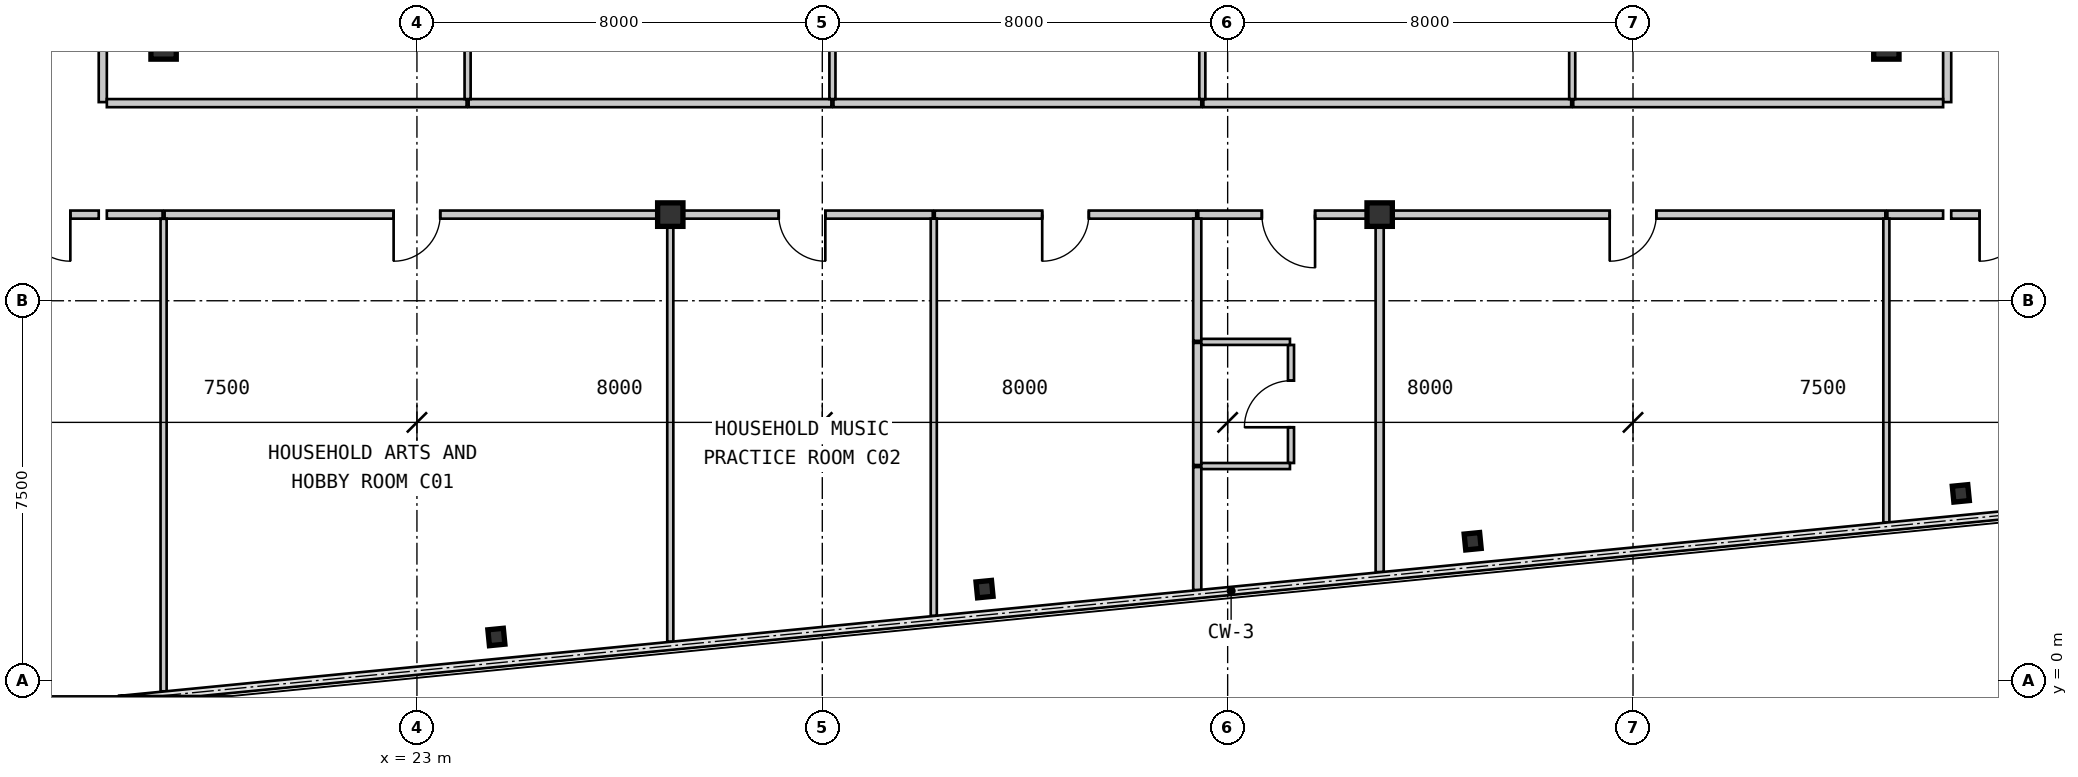
"""IFC4 building model, lengths in metres.
Left out: names, types, materials, properties, quantities, classifications, styles, units other than length and angle.
Written with IfcOpenShell. Run it as: python <this file> out.ifc"""

import sys

from ifc_helpers import new_model, si_unit, direction, frame, frame_2d, origin, origin_2d, place, context, subcontext, project, spatial, rectangle, i_section, extrude, source, transform, mapped, element, fill, save


model = new_model("IFC4")
c1 = context("Model", 3, precision=1e-05, world=origin(), true_north=direction((0.0, 1.0)))
c2 = subcontext(c1, "Body", "Model", "MODEL_VIEW")
j1 = project(units=[si_unit("LENGTHUNIT", "METRE"), si_unit("PLANEANGLEUNIT", "RADIAN")], contexts=[c1])
p1 = place(None, origin())
s1 = spatial("IfcSite", under=j1, at=p1, CompositionType="ELEMENT")
p2 = place(p1, origin())
s2 = spatial("IfcBuilding", under=s1, at=p2, CompositionType="ELEMENT")
p3 = place(p2, frame((0.0, 0.0, 93.45)))
s3 = spatial("IfcBuildingStorey", under=s2, at=p3, CompositionType="ELEMENT", Elevation=93.45)
m1 = source(origin(), c2, "Body", "SweptSolid", [
    extrude(i_section(OverallWidth=0.5, OverallDepth=0.464, WebThickness=0.022, FlangeThickness=0.034, at=origin_2d()), origin(), (0.0, 0.0, 1.0), 3.15),
])
for number, where, z_axis, x_axis in (
    (1, (28.0, 9.2, 0.0), (0.0, 0.0, 1.0), (1.0, 0.0, 0.0)),
    (2, (42.0, 9.2, 0.0), (0.0, 0.0, 1.0), (1.0, 0.0, 0.0)),
    (3, (18.0, 12.5, 0.0), (0.0, 0.0, 1.0), (1.0, 0.0, 0.0)),
    (4, (52.0, 12.5, 0.0), (0.0, 0.0, 1.0), (1.0, 0.0, 0.0)),
):
    element("IfcColumn", number, at=place(p3, frame(where, z_axis=z_axis, x_axis=x_axis)), inside=s3, PredefinedType="COLUMN", context=c2, shape_type="MappedRepresentation", body=[
        mapped(m1, transform((0.0, 0.0, 0.0), scale=1.0)),
    ])
m2 = source(origin(), c2, "Body", "SweptSolid", [
    extrude(i_section(OverallWidth=0.307, OverallDepth=0.315, WebThickness=0.012, FlangeThickness=0.019, at=origin_2d()), origin(), (0.0, 0.0, 1.0), 3.15),
])
for number, where, z_axis, x_axis in (
    (5, (24.568, 0.865, 0.0), (0.0, 0.0, 1.0), (0.995, 0.098, 0.0)),
    (6, (34.202, 1.809, 0.0), (0.0, 0.0, 1.0), (0.995, 0.098, 0.0)),
    (7, (43.835, 2.754, 0.0), (0.0, 0.0, 1.0), (0.995, 0.098, 0.0)),
    (8, (53.469, 3.698, 0.0), (0.0, 0.0, 1.0), (0.995, 0.098, 0.0)),
):
    element("IfcColumn", number, at=place(p3, frame(where, z_axis=z_axis, x_axis=x_axis)), inside=s3, PredefinedType="COLUMN", context=c2, shape_type="MappedRepresentation", body=[
        mapped(m2, transform((0.0, 0.0, 0.0), scale=1.0)),
    ])
m3 = source(origin(), c2, "Body", "SweptSolid", [
    extrude(rectangle(XDim=10.3, YDim=0.16, at=frame_2d((5.15, 0.0))), origin(), (0.0, 0.0, 1.0), 2.93),
])
p4 = place(p3, frame((16.8, 21.72, 0.0), z_axis=(0.0, 0.0, 1.0), x_axis=(0.0, -1.0, 0.0)))
e9 = element("IfcWall", 9, at=p4, inside=s3, PredefinedType="PARTITIONING", context=c2, shape_type="MappedRepresentation", body=[
    mapped(m3, transform((0.0, 0.0, 0.0), scale=1.0)),
])
m4 = source(origin(), c2, "Body", "SweptSolid", [
    extrude(rectangle(XDim=1.05, YDim=2.1, at=frame_2d((0.525, 1.05))), frame((0.0, 0.09, 0.0), z_axis=(0.0, -1.0, 0.0), x_axis=(1.0, 0.0, 0.0)), (0.0, 0.0, 1.0), 0.18),
])
p5 = place(p4, frame((4.595, 0.0, 0.0)))
e10 = element("IfcOpeningElement", 10, at=p5, cuts=e9, PredefinedType="OPENING", context=c2, shape_type="MappedRepresentation", body=[
    mapped(m4, transform((0.0, 0.0, 0.0), scale=1.0)),
])
p6 = place(p3, frame((53.2, 11.42, 0.0), z_axis=(0.0, 0.0, 1.0), x_axis=(0.0, 1.0, 0.0)))
e11 = element("IfcWall", 11, at=p6, inside=s3, PredefinedType="PARTITIONING", context=c2, shape_type="MappedRepresentation", body=[
    mapped(m3, transform((0.0, 0.0, 0.0), scale=1.0)),
])
p7 = place(p6, frame((4.655, 0.0, 0.0)))
e12 = element("IfcOpeningElement", 12, at=p7, cuts=e11, PredefinedType="OPENING", context=c2, shape_type="MappedRepresentation", body=[
    mapped(m4, transform((0.0, 0.0, 0.0), scale=1.0)),
])
m5 = source(origin(), c2, "Body", "SweptSolid", [
    extrude(rectangle(XDim=2.04, YDim=0.16, at=frame_2d((1.02, 0.0))), origin(), (0.0, 0.0, 1.0), 2.93),
])
p8 = place(p3, frame((16.72, 9.2, 0.0), z_axis=(0.0, 0.0, 1.0), x_axis=(-1.0, 0.0, 0.0)))
e13 = element("IfcWall", 13, at=p8, inside=s3, PredefinedType="PARTITIONING", context=c2, shape_type="MappedRepresentation", body=[
    mapped(m5, transform((0.0, 0.0, 0.0), scale=1.0)),
])
m6 = source(origin(), c2, "Body", "SweptSolid", [
    extrude(rectangle(XDim=0.92, YDim=2.1, at=frame_2d((0.46, 1.05))), frame((0.0, 0.09, 0.0), z_axis=(0.0, -1.0, 0.0), x_axis=(1.0, 0.0, 0.0)), (0.0, 0.0, 1.0), 0.18),
])
p9 = place(p8, frame((0.56, 0.0, 0.0)))
e14 = element("IfcOpeningElement", 14, at=p9, cuts=e13, PredefinedType="OPENING", context=c2, shape_type="MappedRepresentation", body=[
    mapped(m6, transform((0.0, 0.0, 0.0), scale=1.0)),
])
p10 = place(p3, frame((55.32, 9.2, 0.0), z_axis=(0.0, 0.0, 1.0), x_axis=(-1.0, 0.0, 0.0)))
e15 = element("IfcWall", 15, at=p10, inside=s3, PredefinedType="PARTITIONING", context=c2, shape_type="MappedRepresentation", body=[
    mapped(m5, transform((0.0, 0.0, 0.0), scale=1.0)),
])
p11 = place(p10, frame((0.56, 0.0, 0.0)))
e16 = element("IfcOpeningElement", 16, at=p11, cuts=e15, PredefinedType="OPENING", context=c2, shape_type="MappedRepresentation", body=[
    mapped(m6, transform((0.0, 0.0, 0.0), scale=1.0)),
])
m7 = source(origin(), c2, "Body", "SweptSolid", [
    extrude(rectangle(XDim=7.1, YDim=0.16, at=frame_2d((3.55, 0.0))), origin(), (0.0, 0.0, 1.0), 2.93),
])
p12 = place(p3, frame((16.88, 11.4, 0.0), z_axis=(0.0, 0.0, 1.0), x_axis=(1.0, 0.0, 0.0)))
e17 = element("IfcWall", 17, at=p12, inside=s3, PredefinedType="PARTITIONING", context=c2, shape_type="MappedRepresentation", body=[
    mapped(m7, transform((0.0, 0.0, 0.0), scale=1.0)),
])
m8 = source(origin(), c2, "Body", "SweptSolid", [
    extrude(rectangle(XDim=7.159, YDim=0.16, at=frame_2d((3.58, 0.0))), origin(), (0.0, 0.0, 1.0), 2.93),
])
p13 = place(p3, frame((24.02, 11.4, 0.0), z_axis=(0.0, 0.0, 1.0), x_axis=(1.0, 0.0, 0.0)))
e18 = element("IfcWall", 18, at=p13, inside=s3, PredefinedType="PARTITIONING", context=c2, shape_type="MappedRepresentation", body=[
    mapped(m8, transform((0.0, 0.0, 0.0), scale=1.0)),
])
m9 = source(origin(), c2, "Body", "SweptSolid", [
    extrude(rectangle(XDim=7.26, YDim=0.16, at=frame_2d((3.63, 0.0))), origin(), (0.0, 0.0, 1.0), 2.93),
])
for number, where, z_axis, x_axis in (
    (19, (31.22, 11.4, 0.0), (0.0, 0.0, 1.0), (1.0, 0.0, 0.0)),
    (20, (38.52, 11.4, 0.0), (0.0, 0.0, 1.0), (1.0, 0.0, 0.0)),
):
    element("IfcWall", number, at=place(p3, frame(where, z_axis=z_axis, x_axis=x_axis)), inside=s3, PredefinedType="PARTITIONING", context=c2, shape_type="MappedRepresentation", body=[
        mapped(m9, transform((0.0, 0.0, 0.0), scale=1.0)),
    ])
m10 = source(origin(), c2, "Body", "SweptSolid", [
    extrude(rectangle(XDim=7.3, YDim=0.16, at=frame_2d((3.65, 0.0))), origin(), (0.0, 0.0, 1.0), 2.93),
])
p14 = place(p3, frame((45.82, 11.4, 0.0), z_axis=(0.0, 0.0, 1.0), x_axis=(1.0, 0.0, 0.0)))
e21 = element("IfcWall", 21, at=p14, inside=s3, PredefinedType="PARTITIONING", context=c2, shape_type="MappedRepresentation", body=[
    mapped(m10, transform((0.0, 0.0, 0.0), scale=1.0)),
])
m11 = source(origin(), c2, "Body", "SweptSolid", [
    extrude(rectangle(XDim=1.1, YDim=0.16, at=frame_2d((0.55, 0.0))), origin(), (0.0, 0.0, 1.0), 2.93),
])
p15 = place(p3, frame((17.98, 9.2, 0.0), z_axis=(0.0, 0.0, 1.0), x_axis=(-1.0, 0.0, 0.0)))
e22 = element("IfcWall", 22, at=p15, inside=s3, PredefinedType="PARTITIONING", context=c2, shape_type="MappedRepresentation", body=[
    mapped(m11, transform((0.0, 0.0, 0.0), scale=1.0)),
])
m12 = source(origin(), c2, "Body", "SweptSolid", [
    extrude(rectangle(XDim=9.959, YDim=0.16, at=frame_2d((4.98, 0.0))), origin(), (0.0, 0.0, 1.0), 2.93),
])
p16 = place(p3, frame((27.98, 9.2, 0.0), z_axis=(0.0, 0.0, 1.0), x_axis=(-1.0, 0.0, 0.0)))
e23 = element("IfcWall", 23, at=p16, inside=s3, PredefinedType="PARTITIONING", context=c2, shape_type="MappedRepresentation", body=[
    mapped(m12, transform((0.0, 0.0, 0.0), scale=1.0)),
])
p17 = place(p16, frame((4.52, 0.0, 0.0)))
e24 = element("IfcOpeningElement", 24, at=p17, cuts=e23, PredefinedType="OPENING", context=c2, shape_type="MappedRepresentation", body=[
    mapped(m6, transform((0.0, 0.0, 0.0), scale=1.0)),
])
m13 = source(origin(), c2, "Body", "SweptSolid", [
    extrude(rectangle(XDim=5.159, YDim=0.16, at=frame_2d((2.58, 0.0))), origin(), (0.0, 0.0, 1.0), 2.328),
])
p18 = place(p3, frame((33.18, 9.2, 0.0), z_axis=(0.0, 0.0, 1.0), x_axis=(-1.0, 0.0, 0.0)))
e25 = element("IfcWall", 25, at=p18, inside=s3, PredefinedType="PARTITIONING", context=c2, shape_type="MappedRepresentation", body=[
    mapped(m13, transform((0.0, 0.0, 0.0), scale=1.0)),
])
p19 = place(p18, frame((2.12, 0.0, 0.0)))
e26 = element("IfcOpeningElement", 26, at=p19, cuts=e25, PredefinedType="OPENING", context=c2, shape_type="MappedRepresentation", body=[
    mapped(m6, transform((0.0, 0.0, 0.0), scale=1.0)),
])
m14 = source(origin(), c2, "Body", "SweptSolid", [
    extrude(rectangle(XDim=5.16, YDim=0.16, at=frame_2d((2.58, 0.0))), origin(), (0.0, 0.0, 1.0), 2.328),
])
p20 = place(p3, frame((38.38, 9.2, 0.0), z_axis=(0.0, 0.0, 1.0), x_axis=(-1.0, 0.0, 0.0)))
e27 = element("IfcWall", 27, at=p20, inside=s3, PredefinedType="PARTITIONING", context=c2, shape_type="MappedRepresentation", body=[
    mapped(m14, transform((0.0, 0.0, 0.0), scale=1.0)),
])
p21 = place(p20, frame((2.12, 0.0, 0.0)))
e28 = element("IfcOpeningElement", 28, at=p21, cuts=e27, PredefinedType="OPENING", context=c2, shape_type="MappedRepresentation", body=[
    mapped(m6, transform((0.0, 0.0, 0.0), scale=1.0)),
])
m15 = source(origin(), c2, "Body", "SweptSolid", [
    extrude(rectangle(XDim=3.559, YDim=0.16, at=frame_2d((1.78, 0.0))), origin(), (0.0, 0.0, 1.0), 2.328),
])
p22 = place(p3, frame((41.98, 9.2, 0.0), z_axis=(0.0, 0.0, 1.0), x_axis=(-1.0, 0.0, 0.0)))
e29 = element("IfcWall", 29, at=p22, inside=s3, PredefinedType="PARTITIONING", context=c2, shape_type="MappedRepresentation", body=[
    mapped(m15, transform((0.0, 0.0, 0.0), scale=1.0)),
])
p23 = place(p22, frame((1.255, 0.0, 0.0)))
e30 = element("IfcOpeningElement", 30, at=p23, cuts=e29, PredefinedType="OPENING", context=c2, shape_type="MappedRepresentation", body=[
    mapped(m4, transform((0.0, 0.0, 0.0), scale=1.0)),
])
p24 = place(p3, frame((51.98, 9.2, 0.0), z_axis=(0.0, 0.0, 1.0), x_axis=(-1.0, 0.0, 0.0)))
e31 = element("IfcWall", 31, at=p24, inside=s3, PredefinedType="PARTITIONING", context=c2, shape_type="MappedRepresentation", body=[
    mapped(m12, transform((0.0, 0.0, 0.0), scale=1.0)),
])
p25 = place(p24, frame((4.52, 0.0, 0.0)))
e32 = element("IfcOpeningElement", 32, at=p25, cuts=e31, PredefinedType="OPENING", context=c2, shape_type="MappedRepresentation", body=[
    mapped(m6, transform((0.0, 0.0, 0.0), scale=1.0)),
])
p26 = place(p3, frame((53.12, 9.2, 0.0), z_axis=(0.0, 0.0, 1.0), x_axis=(-1.0, 0.0, 0.0)))
e33 = element("IfcWall", 33, at=p26, inside=s3, PredefinedType="PARTITIONING", context=c2, shape_type="MappedRepresentation", body=[
    mapped(m11, transform((0.0, 0.0, 0.0), scale=1.0)),
])
m16 = source(origin(), c2, "Body", "SweptSolid", [
    extrude(rectangle(XDim=10.24, YDim=0.12, at=frame_2d((5.12, 0.0))), origin(), (0.0, 0.0, 1.0), 2.93),
])
for number, where, z_axis, x_axis in (
    (34, (24.0, 21.72, 0.0), (0.0, 0.0, 1.0), (0.0, -1.0, 0.0)),
    (35, (31.2, 21.72, 0.0), (0.0, 0.0, 1.0), (0.0, -1.0, 0.0)),
    (36, (38.5, 21.72, 0.0), (0.0, 0.0, 1.0), (0.0, -1.0, 0.0)),
    (37, (45.8, 21.72, 0.0), (0.0, 0.0, 1.0), (0.0, -1.0, 0.0)),
):
    element("IfcWall", number, at=place(p3, frame(where, z_axis=z_axis, x_axis=x_axis)), inside=s3, PredefinedType="PARTITIONING", context=c2, shape_type="MappedRepresentation", body=[
        mapped(m16, transform((0.0, 0.0, 0.0), scale=1.0)),
    ])
m17 = source(origin(), c2, "Body", "SweptSolid", [
    extrude(rectangle(XDim=9.325, YDim=0.12, at=frame_2d((4.663, 0.0))), origin(), (0.0, 0.0, 1.0), 2.93),
])
p27 = place(p3, frame((18.0, 9.118, 0.0), z_axis=(0.0, 0.0, 1.0), x_axis=(0.0, -1.0, 0.0)))
e38 = element("IfcWall", 38, at=p27, inside=s3, PredefinedType="PARTITIONING", context=c2, shape_type="MappedRepresentation", body=[
    mapped(m17, transform((0.0, 0.0, 0.0), scale=1.0)),
])
m18 = source(origin(), c2, "Body", "SweptSolid", [
    extrude(rectangle(XDim=8.349, YDim=0.12, at=frame_2d((4.174, 0.0))), origin(), (0.0, 0.0, 1.0), 2.93),
])
p28 = place(p3, frame((28.0, 9.12, 0.0), z_axis=(0.0, 0.0, 1.0), x_axis=(0.0, -1.0, 0.0)))
e39 = element("IfcWall", 39, at=p28, inside=s3, PredefinedType="PARTITIONING", context=c2, shape_type="MappedRepresentation", body=[
    mapped(m18, transform((0.0, 0.0, 0.0), scale=1.0)),
])
m19 = source(origin(), c2, "Body", "SweptSolid", [
    extrude(rectangle(XDim=7.839, YDim=0.12, at=frame_2d((3.919, 0.0))), origin(), (0.0, 0.0, 1.0), 2.93),
])
p29 = place(p3, frame((33.2, 9.12, 0.0), z_axis=(0.0, 0.0, 1.0), x_axis=(0.0, -1.0, 0.0)))
e40 = element("IfcWall", 40, at=p29, inside=s3, PredefinedType="PARTITIONING", context=c2, shape_type="MappedRepresentation", body=[
    mapped(m19, transform((0.0, 0.0, 0.0), scale=1.0)),
])
m20 = source(origin(), c2, "Body", "SweptSolid", [
    extrude(rectangle(XDim=2.427, YDim=0.16, at=frame_2d((1.214, 0.0))), origin(), (0.0, 0.0, 1.0), 2.93),
])
p30 = place(p3, frame((38.4, 4.218, 0.0), z_axis=(0.0, 0.0, 1.0), x_axis=(0.0, -1.0, 0.0)))
e41 = element("IfcWall", 41, at=p30, inside=s3, PredefinedType="PARTITIONING", context=c2, shape_type="MappedRepresentation", body=[
    mapped(m20, transform((0.0, 0.0, 0.0), scale=1.0)),
])
m21 = source(origin(), c2, "Body", "SweptSolid", [
    extrude(rectangle(XDim=2.412, YDim=0.16, at=frame_2d((1.206, 0.0))), origin(), (0.0, 0.0, 1.0), 2.93),
])
p31 = place(p3, frame((38.4, 9.12, 0.0), z_axis=(0.0, 0.0, 1.0), x_axis=(0.0, -1.0, 0.0)))
e42 = element("IfcWall", 42, at=p31, inside=s3, PredefinedType="PARTITIONING", context=c2, shape_type="MappedRepresentation", body=[
    mapped(m21, transform((0.0, 0.0, 0.0), scale=1.0)),
])
m22 = source(origin(), c2, "Body", "SweptSolid", [
    extrude(rectangle(XDim=2.41, YDim=0.16, at=frame_2d((1.205, 0.0))), origin(), (0.0, 0.0, 1.0), 2.93),
])
p32 = place(p3, frame((38.4, 6.668, 0.0), z_axis=(0.0, 0.0, 1.0), x_axis=(0.0, -1.0, 0.0)))
e43 = element("IfcWall", 43, at=p32, inside=s3, PredefinedType="PARTITIONING", context=c2, shape_type="MappedRepresentation", body=[
    mapped(m22, transform((0.0, 0.0, 0.0), scale=1.0)),
])
m23 = source(origin(), c2, "Body", "SweptSolid", [
    extrude(rectangle(XDim=2.33, YDim=0.12, at=frame_2d((1.165, 0.0))), origin(), (0.0, 0.0, 1.0), 2.93),
])
p33 = place(p3, frame((40.25, 4.298, 0.0), z_axis=(0.0, 0.0, 1.0), x_axis=(0.0, 1.0, 0.0)))
e44 = element("IfcWall", 44, at=p33, inside=s3, PredefinedType="PARTITIONING", context=c2, shape_type="MappedRepresentation", body=[
    mapped(m23, transform((0.0, 0.0, 0.0), scale=1.0)),
])
m24 = source(origin(), c2, "Body", "SweptSolid", [
    extrude(rectangle(XDim=0.92, YDim=2.1, at=frame_2d((0.46, 1.05))), frame((0.0, 0.07, 0.0), z_axis=(0.0, -1.0, 0.0), x_axis=(1.0, 0.0, 0.0)), (0.0, 0.0, 1.0), 0.14),
])
p34 = place(p33, frame((0.705, 0.0, 0.0)))
e45 = element("IfcOpeningElement", 45, at=p34, cuts=e44, PredefinedType="OPENING", context=c2, shape_type="MappedRepresentation", body=[
    mapped(m24, transform((0.0, 0.0, 0.0), scale=1.0)),
])
m25 = source(origin(), c2, "Body", "SweptSolid", [
    extrude(rectangle(XDim=1.75, YDim=0.12, at=frame_2d((0.875, 0.0))), origin(), (0.0, 0.0, 1.0), 2.93),
])
for number, where, z_axis, x_axis in (
    (46, (38.48, 4.238, 0.0), (0.0, 0.0, 1.0), (1.0, 0.0, 0.0)),
    (47, (40.23, 6.688, 0.0), (0.0, 0.0, 1.0), (-1.0, 0.0, 0.0)),
):
    element("IfcWall", number, at=place(p3, frame(where, z_axis=z_axis, x_axis=x_axis)), inside=s3, PredefinedType="PARTITIONING", context=c2, shape_type="MappedRepresentation", body=[
        mapped(m25, transform((0.0, 0.0, 0.0), scale=1.0)),
    ])
m26 = source(origin(), c2, "Body", "SweptSolid", [
    extrude(rectangle(XDim=6.972, YDim=0.16, at=frame_2d((3.486, 0.0))), origin(), (0.0, 0.0, 1.0), 2.93),
])
p35 = place(p3, frame((42.0, 9.118, 0.0), z_axis=(0.0, 0.0, 1.0), x_axis=(0.0, -1.0, 0.0)))
e48 = element("IfcWall", 48, at=p35, inside=s3, PredefinedType="PARTITIONING", context=c2, shape_type="MappedRepresentation", body=[
    mapped(m26, transform((0.0, 0.0, 0.0), scale=1.0)),
])
m27 = source(origin(), c2, "Body", "SweptSolid", [
    extrude(rectangle(XDim=5.996, YDim=0.12, at=frame_2d((2.998, 0.0))), origin(), (0.0, 0.0, 1.0), 2.93),
])
p36 = place(p3, frame((52.0, 9.12, 0.0), z_axis=(0.0, 0.0, 1.0), x_axis=(0.0, -1.0, 0.0)))
e49 = element("IfcWall", 49, at=p36, inside=s3, PredefinedType="PARTITIONING", context=c2, shape_type="MappedRepresentation", body=[
    mapped(m27, transform((0.0, 0.0, 0.0), scale=1.0)),
])
m28 = source(origin(), c2, "Body", "SweptSolid", [
    extrude(rectangle(XDim=0.92, YDim=2.1, at=frame_2d((0.46, 1.05))), frame((0.0, 0.025, 0.0), z_axis=(0.0, -1.0, 0.0), x_axis=(1.0, 0.0, 0.0)), (0.0, 0.0, 1.0), 0.05),
])
p37 = place(p9, origin())
e50 = element("IfcDoor", 50, at=p37, inside=s3, OperationType="SINGLE_SWING_LEFT", PredefinedType="DOOR", context=c2, shape_type="MappedRepresentation", body=[
    mapped(m28, transform((0.0, 0.0, 0.0), scale=1.0)),
])
fill(e14, e50)
p38 = place(p11, origin())
e51 = element("IfcDoor", 51, at=p38, inside=s3, OperationType="SINGLE_SWING_RIGHT", PredefinedType="DOOR", context=c2, shape_type="MappedRepresentation", body=[
    mapped(m28, transform((0.0, 0.0, 0.0), scale=1.0)),
])
fill(e16, e51)
p39 = place(p17, origin())
e52 = element("IfcDoor", 52, at=p39, inside=s3, OperationType="SINGLE_SWING_RIGHT", PredefinedType="DOOR", context=c2, shape_type="MappedRepresentation", body=[
    mapped(m28, transform((0.0, 0.0, 0.0), scale=1.0)),
])
fill(e24, e52)
p40 = place(p19, origin())
e53 = element("IfcDoor", 53, at=p40, inside=s3, OperationType="SINGLE_SWING_LEFT", PredefinedType="DOOR", context=c2, shape_type="MappedRepresentation", body=[
    mapped(m28, transform((0.0, 0.0, 0.0), scale=1.0)),
])
fill(e26, e53)
p41 = place(p21, origin())
e54 = element("IfcDoor", 54, at=p41, inside=s3, OperationType="SINGLE_SWING_RIGHT", PredefinedType="DOOR", context=c2, shape_type="MappedRepresentation", body=[
    mapped(m28, transform((0.0, 0.0, 0.0), scale=1.0)),
])
fill(e28, e54)
m29 = source(origin(), c2, "Body", "SweptSolid", [
    extrude(rectangle(XDim=1.05, YDim=2.1, at=frame_2d((0.525, 1.05))), frame((0.0, 0.025, 0.0), z_axis=(0.0, -1.0, 0.0), x_axis=(1.0, 0.0, 0.0)), (0.0, 0.0, 1.0), 0.05),
])
p42 = place(p23, origin())
e55 = element("IfcDoor", 55, at=p42, inside=s3, OperationType="SINGLE_SWING_LEFT", PredefinedType="DOOR", context=c2, shape_type="MappedRepresentation", body=[
    mapped(m29, transform((0.0, 0.0, 0.0), scale=1.0)),
])
fill(e30, e55)
p43 = place(p25, origin())
e56 = element("IfcDoor", 56, at=p43, inside=s3, OperationType="SINGLE_SWING_RIGHT", PredefinedType="DOOR", context=c2, shape_type="MappedRepresentation", body=[
    mapped(m28, transform((0.0, 0.0, 0.0), scale=1.0)),
])
fill(e32, e56)
p44 = place(p34, origin())
e57 = element("IfcDoor", 57, at=p44, inside=s3, OperationType="SINGLE_SWING_LEFT", PredefinedType="DOOR", context=c2, shape_type="MappedRepresentation", body=[
    mapped(m28, transform((0.0, 0.0, 0.0), scale=1.0)),
])
fill(e45, e57)
save(model, sys.argv[1])
